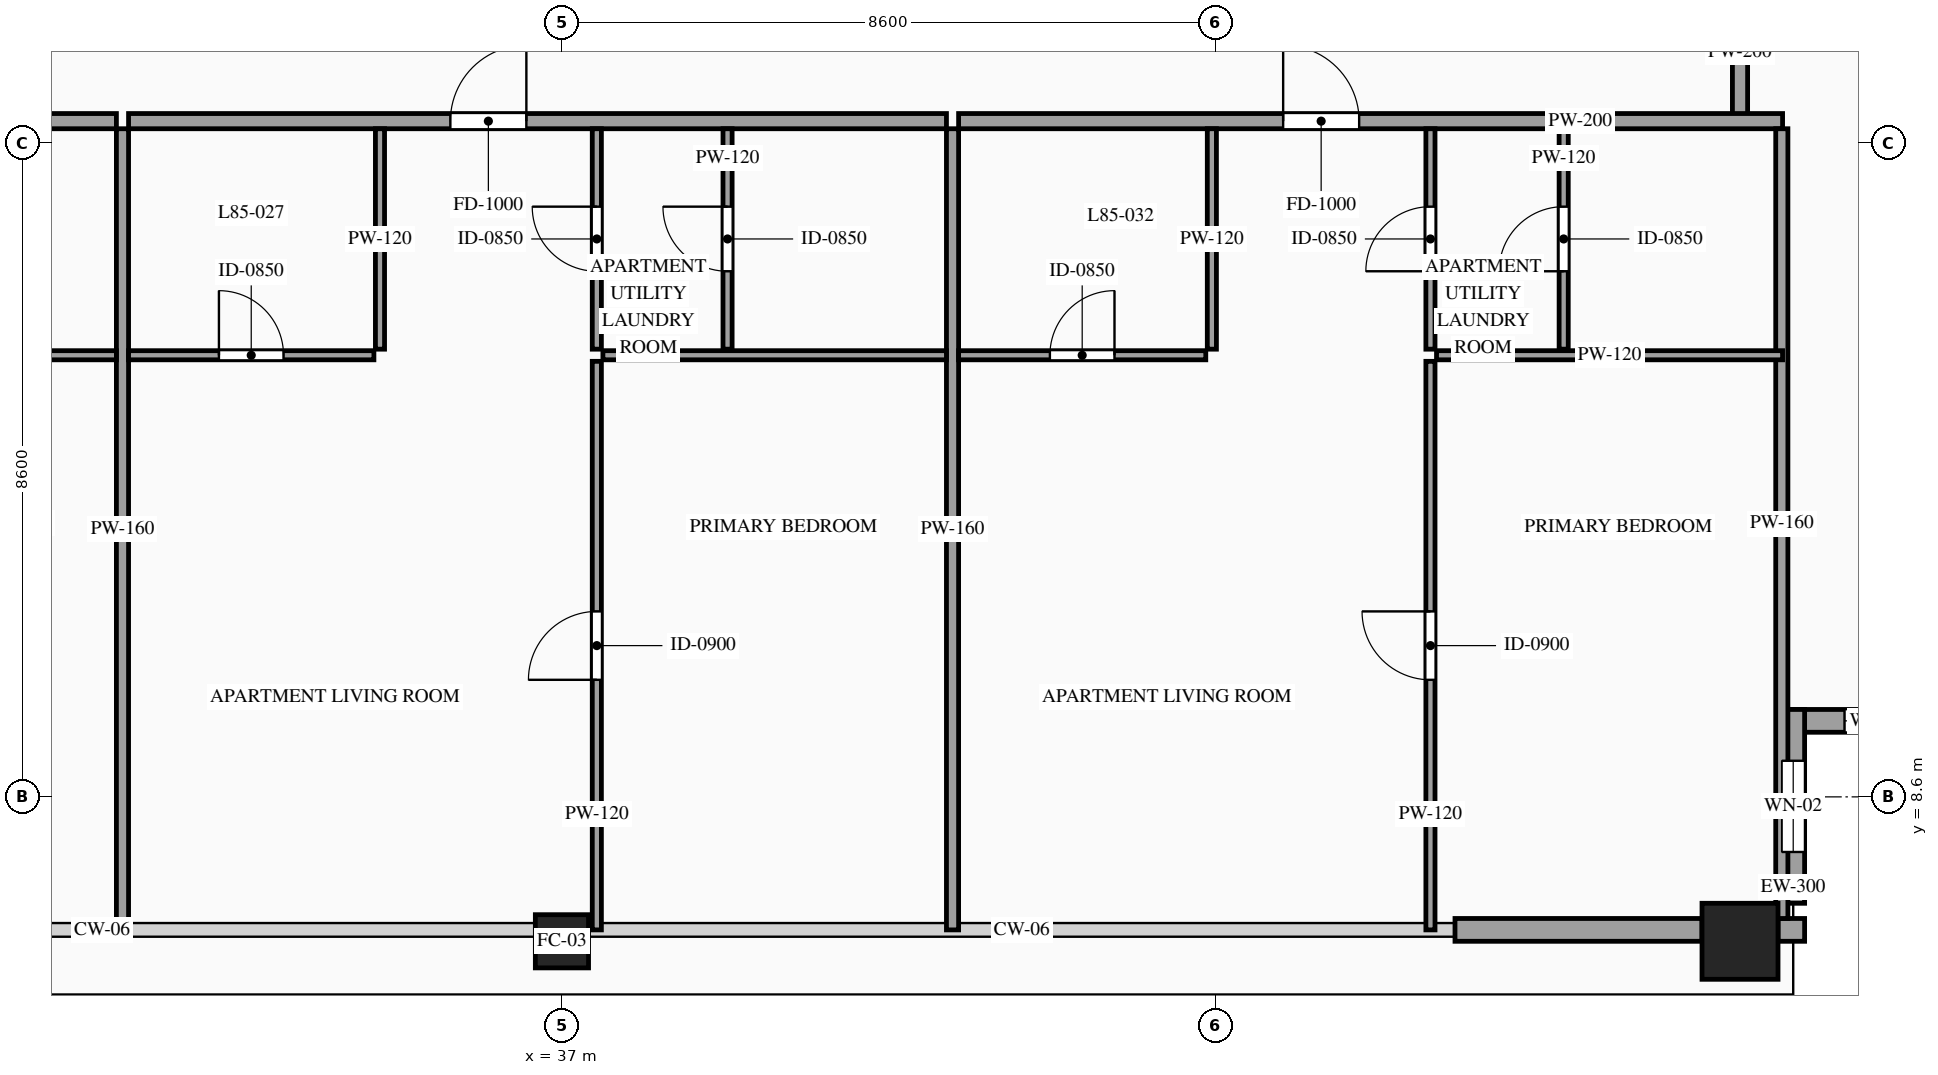
"""IFC4 building model, lengths in metres.
Left out: names, types, materials, properties, quantities, classifications, styles, units other than length and angle.
Written with IfcOpenShell. Run it as: python <this file> out.ifc"""

import sys

from ifc_helpers import new_model, si_unit, direction, frame, frame_2d, origin, origin_2d, place, context, subcontext, project, spatial, rectangle, hollow_rectangle, extrude, source, transform, mapped, element, fill, save


model = new_model("IFC4")
c1 = context("Model", 3, precision=1e-05, world=origin(), true_north=direction((0.0, 1.0)))
c2 = subcontext(c1, "Body", "Model", "MODEL_VIEW")
j1 = project(units=[si_unit("LENGTHUNIT", "METRE"), si_unit("PLANEANGLEUNIT", "RADIAN")], contexts=[c1])
p1 = place(None, origin())
s1 = spatial("IfcSite", under=j1, at=p1, CompositionType="ELEMENT")
p2 = place(p1, origin())
s2 = spatial("IfcBuilding", under=s1, at=p2, CompositionType="ELEMENT")
p3 = place(p2, frame((0.0, 0.0, 318.2)))
s3 = spatial("IfcBuildingStorey", under=s2, at=p3, CompositionType="ELEMENT", Elevation=318.2)
m1 = source(origin(), c2, "Body", "SweptSolid", [
    extrude(hollow_rectangle(XDim=0.7, YDim=0.7, WallThickness=0.032, at=origin_2d()), origin(), (0.0, 0.0, 1.0), 3.5),
])
p4 = place(p3, frame((37.0, 6.7, 0.0), z_axis=(0.0, 0.0, 1.0), x_axis=(1.0, 0.0, 0.0)))
e1 = element("IfcColumn", 1, at=p4, inside=s3, PredefinedType="COLUMN", context=c2, shape_type="MappedRepresentation", body=[
    mapped(m1, transform((0.0, 0.0, 0.0), scale=1.0)),
])
m2 = source(origin(), c2, "Body", "SweptSolid", [
    extrude(hollow_rectangle(XDim=1.0, YDim=1.0, WallThickness=0.048, at=origin_2d()), origin(), (0.0, 0.0, 1.0), 3.5),
])
p5 = place(p3, frame((52.5, 6.7, 0.0), z_axis=(0.0, 0.0, 1.0), x_axis=(1.0, 0.0, 0.0)))
e2 = element("IfcColumn", 2, at=p5, inside=s3, PredefinedType="COLUMN", context=c2, shape_type="MappedRepresentation", body=[
    mapped(m2, transform((0.0, 0.0, 0.0), scale=1.0)),
])
p6 = place(p3, frame((53.05, 9.6, 0.0), z_axis=(0.0, 0.0, 1.0), x_axis=(1.0, 0.0, 0.0)))
e3 = element("IfcWall", 3, at=p6, inside=s3, PredefinedType="SOLIDWALL", context=c2, shape_type="SweptSolid", body=[
    extrude(rectangle(XDim=2.55, YDim=0.3, at=frame_2d((1.275, 0.0))), origin(), (0.0, 0.0, 1.0), 3.28),
])
p7 = place(p6, frame((0.825, 0.0, 0.85)))
e4 = element("IfcOpeningElement", 4, at=p7, cuts=e3, PredefinedType="OPENING", context=c2, shape_type="SweptSolid", body=[
    extrude(rectangle(XDim=0.9, YDim=1.5, at=frame_2d((0.45, 0.75))), frame((0.0, 0.165, 0.0), z_axis=(0.0, -1.0, 0.0), x_axis=(1.0, 0.0, 0.0)), (0.0, 0.0, 1.0), 0.33),
])
p8 = place(p3, frame((53.2, 7.2, 0.0), z_axis=(0.0, 0.0, 1.0), x_axis=(0.0, 1.0, 0.0)))
e5 = element("IfcWall", 5, at=p8, inside=s3, PredefinedType="SOLIDWALL", context=c2, shape_type="SweptSolid", body=[
    extrude(rectangle(XDim=2.55, YDim=0.3, at=frame_2d((1.275, 0.0))), origin(), (0.0, 0.0, 1.0), 3.28),
])
p9 = place(p8, frame((0.675, 0.0, 0.85)))
e6 = element("IfcOpeningElement", 6, at=p9, cuts=e5, PredefinedType="OPENING", context=c2, shape_type="SweptSolid", body=[
    extrude(rectangle(XDim=1.2, YDim=2.1, at=frame_2d((0.6, 1.05))), frame((0.0, 0.165, 0.0), z_axis=(0.0, -1.0, 0.0), x_axis=(1.0, 0.0, 0.0)), (0.0, 0.0, 1.0), 0.33),
])
m3 = source(origin(), c2, "Body", "SweptSolid", [
    extrude(rectangle(XDim=0.35, YDim=0.3, at=frame_2d((0.175, 0.0))), origin(), (0.0, 0.0, 1.0), 3.28),
])
p10 = place(p3, frame((53.0, 6.85, 0.0), z_axis=(0.0, 0.0, 1.0), x_axis=(1.0, 0.0, 0.0)))
e7 = element("IfcWall", 7, at=p10, inside=s3, PredefinedType="SOLIDWALL", context=c2, shape_type="MappedRepresentation", body=[
    mapped(m3, transform((0.0, 0.0, 0.0), scale=1.0)),
])
m4 = source(origin(), c2, "Body", "SweptSolid", [
    extrude(rectangle(XDim=3.25, YDim=0.3, at=frame_2d((1.625, 0.0))), origin(), (0.0, 0.0, 1.0), 2.885),
])
p11 = place(p3, frame((48.75, 6.85, 0.0), z_axis=(0.0, 0.0, 1.0), x_axis=(1.0, 0.0, 0.0)))
e8 = element("IfcWall", 8, at=p11, inside=s3, PredefinedType="SOLIDWALL", context=c2, shape_type="MappedRepresentation", body=[
    mapped(m4, transform((0.0, 0.0, 0.0), scale=1.0)),
])
m5 = source(origin(), c2, "Body", "SweptSolid", [
    extrude(rectangle(XDim=1.7, YDim=0.2, at=frame_2d((0.85, 0.0))), origin(), (0.0, 0.0, 1.0), 3.28),
])
p12 = place(p3, frame((52.5, 17.55, 0.0), z_axis=(0.0, 0.0, 1.0), x_axis=(0.0, 1.0, 0.0)))
e9 = element("IfcWall", 9, at=p12, inside=s3, PredefinedType="PARTITIONING", context=c2, shape_type="MappedRepresentation", body=[
    mapped(m5, transform((0.0, 0.0, 0.0), scale=1.0)),
])
p13 = place(p3, frame((20.94, 17.49, 0.0), z_axis=(0.0, 0.0, 1.0), x_axis=(1.0, 0.0, 0.0)))
e10 = element("IfcWall", 10, at=p13, inside=s3, PredefinedType="PARTITIONING", context=c2, shape_type="SweptSolid", body=[
    extrude(rectangle(XDim=10.198, YDim=0.2, at=frame_2d((5.099, 0.0))), origin(), (0.0, 0.0, 1.0), 3.28),
])
p14 = place(p13, frame((3.987, 0.0, 0.0)))
e11 = element("IfcOpeningElement", 11, at=p14, cuts=e10, PredefinedType="OPENING", context=c2, shape_type="SweptSolid", body=[
    extrude(rectangle(XDim=1.0, YDim=2.2, at=frame_2d((0.5, 1.1))), frame((0.0, 0.115, 0.0), z_axis=(0.0, -1.0, 0.0), x_axis=(1.0, 0.0, 0.0)), (0.0, 0.0, 1.0), 0.23),
])
m6 = source(origin(), c2, "Body", "SweptSolid", [
    extrude(rectangle(XDim=10.54, YDim=0.16, at=frame_2d((5.27, 0.0))), origin(), (0.0, 0.0, 1.0), 3.28),
])
p15 = place(p3, frame((31.218, 6.85, 0.0), z_axis=(0.0, 0.0, 1.0), x_axis=(0.0, 1.0, 0.0)))
e12 = element("IfcWall", 12, at=p15, inside=s3, PredefinedType="PARTITIONING", context=c2, shape_type="MappedRepresentation", body=[
    mapped(m6, transform((0.0, 0.0, 0.0), scale=1.0)),
])
m7 = source(origin(), c2, "Body", "SweptSolid", [
    extrude(rectangle(XDim=4.283, YDim=0.12, at=frame_2d((2.142, 0.0))), origin(), (0.0, 0.0, 1.0), 3.28),
])
p16 = place(p3, frame((26.855, 14.41, 0.0), z_axis=(0.0, 0.0, 1.0), x_axis=(1.0, 0.0, 0.0)))
e13 = element("IfcWall", 13, at=p16, inside=s3, PredefinedType="PARTITIONING", context=c2, shape_type="MappedRepresentation", body=[
    mapped(m7, transform((0.0, 0.0, 0.0), scale=1.0)),
])
p17 = place(p3, frame((31.298, 17.49, 0.0), z_axis=(0.0, 0.0, 1.0), x_axis=(1.0, 0.0, 0.0)))
e14 = element("IfcWall", 14, at=p17, inside=s3, PredefinedType="PARTITIONING", context=c2, shape_type="SweptSolid", body=[
    extrude(rectangle(XDim=10.761, YDim=0.2, at=frame_2d((5.38, 0.0))), origin(), (0.0, 0.0, 1.0), 3.28),
])
p18 = place(p17, frame((4.234, 0.0, 0.0)))
e15 = element("IfcOpeningElement", 15, at=p18, cuts=e14, PredefinedType="OPENING", context=c2, shape_type="SweptSolid", body=[
    extrude(rectangle(XDim=1.0, YDim=2.2, at=frame_2d((0.5, 1.1))), frame((0.0, 0.115, 0.0), z_axis=(0.0, -1.0, 0.0), x_axis=(1.0, 0.0, 0.0)), (0.0, 0.0, 1.0), 0.23),
])
p19 = place(p3, frame((42.139, 6.85, 0.0), z_axis=(0.0, 0.0, 1.0), x_axis=(0.0, 1.0, 0.0)))
e16 = element("IfcWall", 16, at=p19, inside=s3, PredefinedType="PARTITIONING", context=c2, shape_type="MappedRepresentation", body=[
    mapped(m6, transform((0.0, 0.0, 0.0), scale=1.0)),
])
p20 = place(p3, frame((31.298, 14.41, 0.0), z_axis=(0.0, 0.0, 1.0), x_axis=(1.0, 0.0, 0.0)))
e17 = element("IfcWall", 17, at=p20, inside=s3, PredefinedType="PARTITIONING", context=c2, shape_type="SweptSolid", body=[
    extrude(rectangle(XDim=3.228, YDim=0.12, at=frame_2d((1.614, 0.0))), origin(), (0.0, 0.0, 1.0), 3.28),
])
p21 = place(p20, frame((1.189, 0.0, 0.0)))
e18 = element("IfcOpeningElement", 18, at=p21, cuts=e17, PredefinedType="OPENING", context=c2, shape_type="SweptSolid", body=[
    extrude(rectangle(XDim=0.85, YDim=2.1, at=frame_2d((0.425, 1.05))), frame((0.0, 0.075, 0.0), z_axis=(0.0, -1.0, 0.0), x_axis=(1.0, 0.0, 0.0)), (0.0, 0.0, 1.0), 0.15),
])
m8 = source(origin(), c2, "Body", "SweptSolid", [
    extrude(rectangle(XDim=2.9, YDim=0.12, at=frame_2d((1.45, 0.0))), origin(), (0.0, 0.0, 1.0), 3.28),
])
p22 = place(p3, frame((34.606, 14.49, 0.0), z_axis=(0.0, 0.0, 1.0), x_axis=(0.0, 1.0, 0.0)))
e19 = element("IfcWall", 19, at=p22, inside=s3, PredefinedType="PARTITIONING", context=c2, shape_type="MappedRepresentation", body=[
    mapped(m8, transform((0.0, 0.0, 0.0), scale=1.0)),
])
p23 = place(p3, frame((39.179, 14.49, 0.0), z_axis=(0.0, 0.0, 1.0), x_axis=(0.0, 1.0, 0.0)))
e20 = element("IfcWall", 20, at=p23, inside=s3, PredefinedType="PARTITIONING", context=c2, shape_type="SweptSolid", body=[
    extrude(rectangle(XDim=2.9, YDim=0.12, at=frame_2d((1.45, 0.0))), origin(), (0.0, 0.0, 1.0), 3.28),
])
p24 = place(p23, frame((1.025, 0.0, 0.0)))
e21 = element("IfcOpeningElement", 21, at=p24, cuts=e20, PredefinedType="OPENING", context=c2, shape_type="SweptSolid", body=[
    extrude(rectangle(XDim=0.85, YDim=2.1, at=frame_2d((0.425, 1.05))), frame((0.0, 0.075, 0.0), z_axis=(0.0, -1.0, 0.0), x_axis=(1.0, 0.0, 0.0)), (0.0, 0.0, 1.0), 0.15),
])
m9 = source(origin(), c2, "Body", "SweptSolid", [
    extrude(rectangle(XDim=4.52, YDim=0.12, at=frame_2d((2.26, 0.0))), origin(), (0.0, 0.0, 1.0), 3.28),
])
p25 = place(p3, frame((37.539, 14.41, 0.0), z_axis=(0.0, 0.0, 1.0), x_axis=(1.0, 0.0, 0.0)))
e22 = element("IfcWall", 22, at=p25, inside=s3, PredefinedType="PARTITIONING", context=c2, shape_type="MappedRepresentation", body=[
    mapped(m9, transform((0.0, 0.0, 0.0), scale=1.0)),
])
p26 = place(p3, frame((37.459, 6.85, 0.0), z_axis=(0.0, 0.0, 1.0), x_axis=(0.0, 1.0, 0.0)))
e23 = element("IfcWall", 23, at=p26, inside=s3, PredefinedType="PARTITIONING", context=c2, shape_type="SweptSolid", body=[
    extrude(rectangle(XDim=7.48, YDim=0.12, at=frame_2d((3.74, 0.0))), origin(), (0.0, 0.0, 1.0), 3.28),
])
p27 = place(p26, frame((3.29, 0.0, 0.0)))
e24 = element("IfcOpeningElement", 24, at=p27, cuts=e23, PredefinedType="OPENING", context=c2, shape_type="SweptSolid", body=[
    extrude(rectangle(XDim=0.9, YDim=2.15, at=frame_2d((0.45, 1.075))), frame((0.0, 0.075, 0.0), z_axis=(0.0, -1.0, 0.0), x_axis=(1.0, 0.0, 0.0)), (0.0, 0.0, 1.0), 0.15),
])
p28 = place(p3, frame((37.459, 14.49, 0.0), z_axis=(0.0, 0.0, 1.0), x_axis=(0.0, 1.0, 0.0)))
e25 = element("IfcWall", 25, at=p28, inside=s3, PredefinedType="PARTITIONING", context=c2, shape_type="SweptSolid", body=[
    extrude(rectangle(XDim=2.9, YDim=0.12, at=frame_2d((1.45, 0.0))), origin(), (0.0, 0.0, 1.0), 3.28),
])
p29 = place(p28, frame((1.025, 0.0, 0.0)))
e26 = element("IfcOpeningElement", 26, at=p29, cuts=e25, PredefinedType="OPENING", context=c2, shape_type="SweptSolid", body=[
    extrude(rectangle(XDim=0.85, YDim=2.1, at=frame_2d((0.425, 1.05))), frame((0.0, 0.075, 0.0), z_axis=(0.0, -1.0, 0.0), x_axis=(1.0, 0.0, 0.0)), (0.0, 0.0, 1.0), 0.15),
])
p30 = place(p3, frame((42.219, 17.49, 0.0), z_axis=(0.0, 0.0, 1.0), x_axis=(1.0, 0.0, 0.0)))
e27 = element("IfcWall", 27, at=p30, inside=s3, PredefinedType="PARTITIONING", context=c2, shape_type="SweptSolid", body=[
    extrude(rectangle(XDim=10.841, YDim=0.2, at=frame_2d((5.42, 0.0))), origin(), (0.0, 0.0, 1.0), 3.28),
])
p31 = place(p30, frame((4.27, 0.0, 0.0)))
e28 = element("IfcOpeningElement", 28, at=p31, cuts=e27, PredefinedType="OPENING", context=c2, shape_type="SweptSolid", body=[
    extrude(rectangle(XDim=1.0, YDim=2.2, at=frame_2d((0.5, 1.1))), frame((0.0, 0.115, 0.0), z_axis=(0.0, -1.0, 0.0), x_axis=(1.0, 0.0, 0.0)), (0.0, 0.0, 1.0), 0.23),
])
m10 = source(origin(), c2, "Body", "SweptSolid", [
    extrude(rectangle(XDim=10.39, YDim=0.16, at=frame_2d((5.195, 0.0))), origin(), (0.0, 0.0, 1.0), 3.28),
])
p32 = place(p3, frame((53.05, 7.0, 0.0), z_axis=(0.0, 0.0, 1.0), x_axis=(0.0, 1.0, 0.0)))
e29 = element("IfcWall", 29, at=p32, inside=s3, PredefinedType="PARTITIONING", context=c2, shape_type="MappedRepresentation", body=[
    mapped(m10, transform((0.0, 0.0, 0.0), scale=1.0)),
])
p33 = place(p3, frame((42.219, 14.41, 0.0), z_axis=(0.0, 0.0, 1.0), x_axis=(1.0, 0.0, 0.0)))
e30 = element("IfcWall", 30, at=p33, inside=s3, PredefinedType="PARTITIONING", context=c2, shape_type="SweptSolid", body=[
    extrude(rectangle(XDim=3.252, YDim=0.12, at=frame_2d((1.626, 0.0))), origin(), (0.0, 0.0, 1.0), 3.28),
])
p34 = place(p33, frame((1.201, 0.0, 0.0)))
e31 = element("IfcOpeningElement", 31, at=p34, cuts=e30, PredefinedType="OPENING", context=c2, shape_type="SweptSolid", body=[
    extrude(rectangle(XDim=0.85, YDim=2.1, at=frame_2d((0.425, 1.05))), frame((0.0, 0.075, 0.0), z_axis=(0.0, -1.0, 0.0), x_axis=(1.0, 0.0, 0.0)), (0.0, 0.0, 1.0), 0.15),
])
p35 = place(p3, frame((45.551, 14.49, 0.0), z_axis=(0.0, 0.0, 1.0), x_axis=(0.0, 1.0, 0.0)))
e32 = element("IfcWall", 32, at=p35, inside=s3, PredefinedType="PARTITIONING", context=c2, shape_type="MappedRepresentation", body=[
    mapped(m8, transform((0.0, 0.0, 0.0), scale=1.0)),
])
p36 = place(p3, frame((50.18, 14.49, 0.0), z_axis=(0.0, 0.0, 1.0), x_axis=(0.0, 1.0, 0.0)))
e33 = element("IfcWall", 33, at=p36, inside=s3, PredefinedType="PARTITIONING", context=c2, shape_type="SweptSolid", body=[
    extrude(rectangle(XDim=2.9, YDim=0.12, at=frame_2d((1.45, 0.0))), origin(), (0.0, 0.0, 1.0), 2.825),
])
p37 = place(p36, frame((1.025, 0.0, 0.0)))
e34 = element("IfcOpeningElement", 34, at=p37, cuts=e33, PredefinedType="OPENING", context=c2, shape_type="SweptSolid", body=[
    extrude(rectangle(XDim=0.85, YDim=2.1, at=frame_2d((0.425, 1.05))), frame((0.0, 0.075, 0.0), z_axis=(0.0, -1.0, 0.0), x_axis=(1.0, 0.0, 0.0)), (0.0, 0.0, 1.0), 0.15),
])
m11 = source(origin(), c2, "Body", "SweptSolid", [
    extrude(rectangle(XDim=4.553, YDim=0.12, at=frame_2d((2.276, 0.0))), origin(), (0.0, 0.0, 1.0), 3.28),
])
p38 = place(p3, frame((48.507, 14.41, 0.0), z_axis=(0.0, 0.0, 1.0), x_axis=(1.0, 0.0, 0.0)))
e35 = element("IfcWall", 35, at=p38, inside=s3, PredefinedType="PARTITIONING", context=c2, shape_type="MappedRepresentation", body=[
    mapped(m11, transform((0.0, 0.0, 0.0), scale=1.0)),
])
p39 = place(p3, frame((48.427, 6.85, 0.0), z_axis=(0.0, 0.0, 1.0), x_axis=(0.0, 1.0, 0.0)))
e36 = element("IfcWall", 36, at=p39, inside=s3, PredefinedType="PARTITIONING", context=c2, shape_type="SweptSolid", body=[
    extrude(rectangle(XDim=7.48, YDim=0.12, at=frame_2d((3.74, 0.0))), origin(), (0.0, 0.0, 1.0), 3.28),
])
p40 = place(p39, frame((3.29, 0.0, 0.0)))
e37 = element("IfcOpeningElement", 37, at=p40, cuts=e36, PredefinedType="OPENING", context=c2, shape_type="SweptSolid", body=[
    extrude(rectangle(XDim=0.9, YDim=2.15, at=frame_2d((0.45, 1.075))), frame((0.0, 0.075, 0.0), z_axis=(0.0, -1.0, 0.0), x_axis=(1.0, 0.0, 0.0)), (0.0, 0.0, 1.0), 0.15),
])
p41 = place(p3, frame((48.427, 14.49, 0.0), z_axis=(0.0, 0.0, 1.0), x_axis=(0.0, 1.0, 0.0)))
e38 = element("IfcWall", 38, at=p41, inside=s3, PredefinedType="PARTITIONING", context=c2, shape_type="SweptSolid", body=[
    extrude(rectangle(XDim=2.9, YDim=0.12, at=frame_2d((1.45, 0.0))), origin(), (0.0, 0.0, 1.0), 3.28),
])
p42 = place(p41, frame((1.025, 0.0, 0.0)))
e39 = element("IfcOpeningElement", 39, at=p42, cuts=e38, PredefinedType="OPENING", context=c2, shape_type="SweptSolid", body=[
    extrude(rectangle(XDim=0.85, YDim=2.1, at=frame_2d((0.425, 1.05))), frame((0.0, 0.075, 0.0), z_axis=(0.0, -1.0, 0.0), x_axis=(1.0, 0.0, 0.0)), (0.0, 0.0, 1.0), 0.15),
])
m12 = source(origin(), c2, "Body", "SweptSolid", [
    extrude(rectangle(XDim=0.9, YDim=1.5, at=frame_2d((0.45, 0.75))), frame((0.0, 0.03, 0.0), z_axis=(0.0, -1.0, 0.0), x_axis=(1.0, 0.0, 0.0)), (0.0, 0.0, 1.0), 0.06),
])
p43 = place(p7, origin())
e40 = element("IfcWindow", 40, at=p43, inside=s3, PartitioningType="SINGLE_PANEL", PredefinedType="WINDOW", context=c2, shape_type="MappedRepresentation", body=[
    mapped(m12, transform((0.0, 0.0, 0.0), scale=1.0)),
])
fill(e4, e40)
m13 = source(origin(), c2, "Body", "SweptSolid", [
    extrude(rectangle(XDim=1.2, YDim=2.1, at=frame_2d((0.6, 1.05))), frame((0.0, 0.03, 0.0), z_axis=(0.0, -1.0, 0.0), x_axis=(1.0, 0.0, 0.0)), (0.0, 0.0, 1.0), 0.06),
])
p44 = place(p9, origin())
e41 = element("IfcWindow", 41, at=p44, inside=s3, PartitioningType="SINGLE_PANEL", PredefinedType="WINDOW", context=c2, shape_type="MappedRepresentation", body=[
    mapped(m13, transform((0.0, 0.0, 0.0), scale=1.0)),
])
fill(e6, e41)
m14 = source(origin(), c2, "Body", "SweptSolid", [
    extrude(rectangle(XDim=1.0, YDim=2.2, at=frame_2d((0.5, 1.1))), frame((0.0, 0.025, 0.0), z_axis=(0.0, -1.0, 0.0), x_axis=(1.0, 0.0, 0.0)), (0.0, 0.0, 1.0), 0.05),
])
p45 = place(p18, origin())
e42 = element("IfcDoor", 42, at=p45, inside=s3, OperationType="SINGLE_SWING_RIGHT", PredefinedType="DOOR", context=c2, shape_type="MappedRepresentation", body=[
    mapped(m14, transform((0.0, 0.0, 0.0), scale=1.0)),
])
fill(e15, e42)
m15 = source(origin(), c2, "Body", "SweptSolid", [
    extrude(rectangle(XDim=0.85, YDim=2.1, at=frame_2d((0.425, 1.05))), frame((0.0, 0.025, 0.0), z_axis=(0.0, -1.0, 0.0), x_axis=(1.0, 0.0, 0.0)), (0.0, 0.0, 1.0), 0.05),
])
p46 = place(p21, origin())
e43 = element("IfcDoor", 43, at=p46, inside=s3, OperationType="SINGLE_SWING_LEFT", PredefinedType="DOOR", context=c2, shape_type="MappedRepresentation", body=[
    mapped(m15, transform((0.0, 0.0, 0.0), scale=1.0)),
])
fill(e18, e43)
p47 = place(p24, origin())
e44 = element("IfcDoor", 44, at=p47, inside=s3, OperationType="SINGLE_SWING_RIGHT", PredefinedType="DOOR", context=c2, shape_type="MappedRepresentation", body=[
    mapped(m15, transform((0.0, 0.0, 0.0), scale=1.0)),
])
fill(e21, e44)
m16 = source(origin(), c2, "Body", "SweptSolid", [
    extrude(rectangle(XDim=0.9, YDim=2.15, at=frame_2d((0.45, 1.075))), frame((0.0, 0.025, 0.0), z_axis=(0.0, -1.0, 0.0), x_axis=(1.0, 0.0, 0.0)), (0.0, 0.0, 1.0), 0.05),
])
p48 = place(p27, origin())
e45 = element("IfcDoor", 45, at=p48, inside=s3, OperationType="SINGLE_SWING_LEFT", PredefinedType="DOOR", context=c2, shape_type="MappedRepresentation", body=[
    mapped(m16, transform((0.0, 0.0, 0.0), scale=1.0)),
])
fill(e24, e45)
p49 = place(p29, origin())
e46 = element("IfcDoor", 46, at=p49, inside=s3, OperationType="SINGLE_SWING_RIGHT", PredefinedType="DOOR", context=c2, shape_type="MappedRepresentation", body=[
    mapped(m15, transform((0.0, 0.0, 0.0), scale=1.0)),
])
fill(e26, e46)
p50 = place(p31, origin())
e47 = element("IfcDoor", 47, at=p50, inside=s3, OperationType="SINGLE_SWING_LEFT", PredefinedType="DOOR", context=c2, shape_type="MappedRepresentation", body=[
    mapped(m14, transform((0.0, 0.0, 0.0), scale=1.0)),
])
fill(e28, e47)
p51 = place(p34, origin())
e48 = element("IfcDoor", 48, at=p51, inside=s3, OperationType="SINGLE_SWING_RIGHT", PredefinedType="DOOR", context=c2, shape_type="MappedRepresentation", body=[
    mapped(m15, transform((0.0, 0.0, 0.0), scale=1.0)),
])
fill(e31, e48)
p52 = place(p37, origin())
e49 = element("IfcDoor", 49, at=p52, inside=s3, OperationType="SINGLE_SWING_LEFT", PredefinedType="DOOR", context=c2, shape_type="MappedRepresentation", body=[
    mapped(m15, transform((0.0, 0.0, 0.0), scale=1.0)),
])
fill(e34, e49)
p53 = place(p40, origin())
e50 = element("IfcDoor", 50, at=p53, inside=s3, OperationType="SINGLE_SWING_RIGHT", PredefinedType="DOOR", context=c2, shape_type="MappedRepresentation", body=[
    mapped(m16, transform((0.0, 0.0, 0.0), scale=1.0)),
])
fill(e37, e50)
p54 = place(p42, origin())
e51 = element("IfcDoor", 51, at=p54, inside=s3, OperationType="SINGLE_SWING_LEFT", PredefinedType="DOOR", context=c2, shape_type="MappedRepresentation", body=[
    mapped(m15, transform((0.0, 0.0, 0.0), scale=1.0)),
])
fill(e39, e51)
save(model, sys.argv[1])
